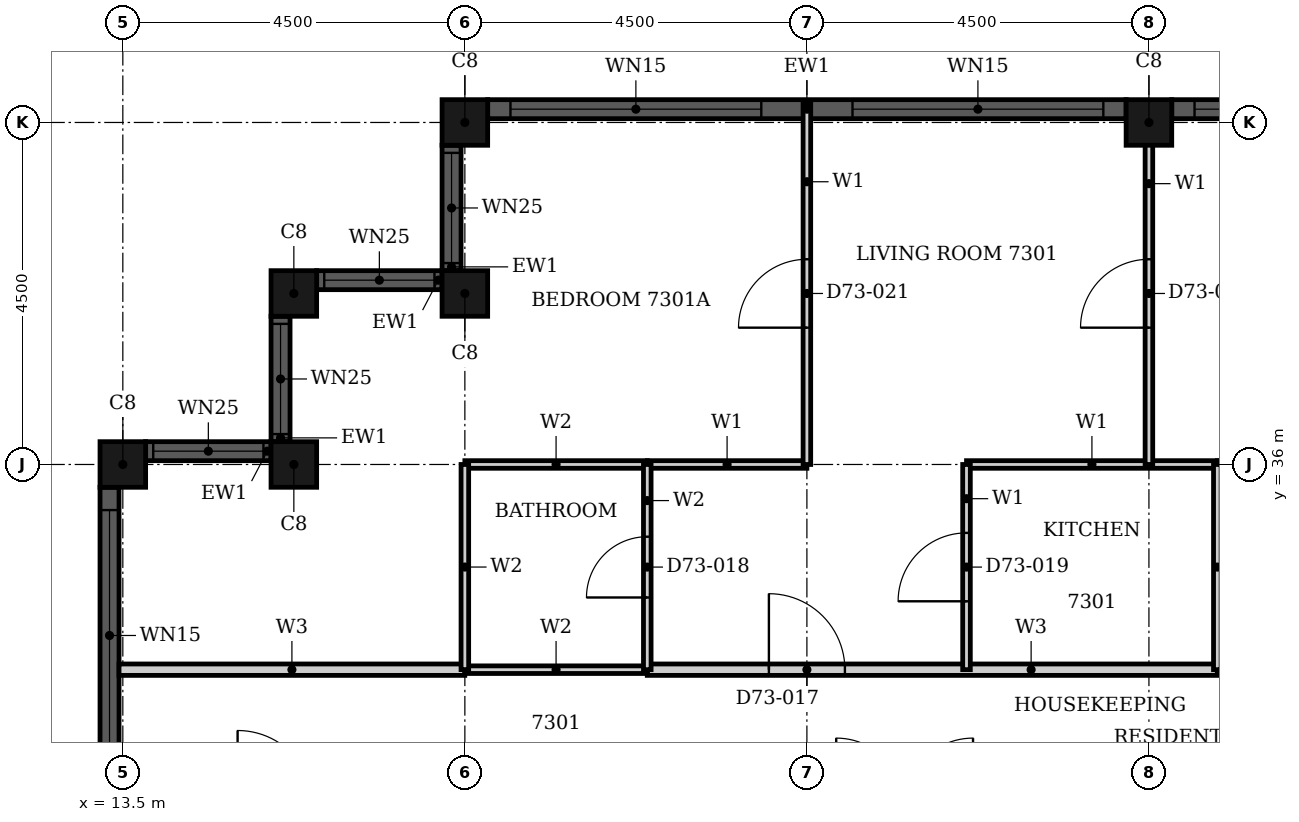
"""IFC4 building model, lengths in metres.
Left out: names, types, materials, properties, quantities, classifications, styles, units other than length and angle.
Written with IfcOpenShell. Run it as: python <this file> out.ifc"""

import sys

from ifc_helpers import new_model, si_unit, direction, frame, frame_2d, origin, origin_2d, place, context, subcontext, project, spatial, rectangle, hollow_rectangle, extrude, element, fill, save


model = new_model("IFC4")
c1 = context("Model", 3, precision=1e-05, world=origin(), true_north=direction((0.0, 1.0)))
c2 = subcontext(c1, "Body", "Model", "MODEL_VIEW")
j1 = project(units=[si_unit("LENGTHUNIT", "METRE"), si_unit("PLANEANGLEUNIT", "RADIAN")], contexts=[c1])
p1 = place(None, origin())
s1 = spatial("IfcSite", under=j1, at=p1, CompositionType="ELEMENT")
p2 = place(p1, origin())
s2 = spatial("IfcBuilding", under=s1, at=p2, CompositionType="ELEMENT")
p3 = place(p2, frame((0.0, 0.0, 287.1)))
s3 = spatial("IfcBuildingStorey", under=s2, at=p3, CompositionType="ELEMENT", Elevation=287.1)
for number, where, z_axis, x_axis in (
    (1, (27.0, 40.5, 0.0), (0.0, 0.0, 1.0), (1.0, 0.0, 0.0)),
    (2, (18.0, 40.5, 0.0), (0.0, 0.0, 1.0), (1.0, 0.0, 0.0)),
    (3, (18.0, 38.25, 0.0), (0.0, 0.0, 1.0), (1.0, 0.0, 0.0)),
    (4, (15.75, 38.25, 0.0), (0.0, 0.0, 1.0), (1.0, 0.0, 0.0)),
    (5, (15.75, 36.0, 0.0), (0.0, 0.0, 1.0), (1.0, 0.0, 0.0)),
    (6, (13.5, 36.0, 0.0), (0.0, 0.0, 1.0), (1.0, 0.0, 0.0)),
):
    element("IfcColumn", number, at=place(p3, frame(where, z_axis=z_axis, x_axis=x_axis)), inside=s3, PredefinedType="COLUMN", context=c2, shape_type="SweptSolid", body=[
        extrude(hollow_rectangle(XDim=0.6, YDim=0.6, WallThickness=0.02, at=origin_2d()), origin(), (0.0, 0.0, 1.0), 3.7),
    ])
p4 = place(p3, frame((35.7, 40.675, 0.0), z_axis=(0.0, 0.0, 1.0), x_axis=(-1.0, 0.0, 0.0)))
e7 = element("IfcWall", 7, at=p4, inside=s3, PredefinedType="SOLIDWALL", context=c2, shape_type="SweptSolid", body=[
    extrude(rectangle(XDim=8.4, YDim=0.25, at=frame_2d((4.2, 0.0))), origin(), (0.0, 0.0, 1.0), 3.7),
])
p5 = place(p4, frame((0.3, 0.0, 0.45)))
e8 = element("IfcOpeningElement", 8, at=p5, cuts=e7, PredefinedType="OPENING", context=c2, shape_type="SweptSolid", body=[
    extrude(rectangle(XDim=3.3, YDim=2.3, at=frame_2d((1.65, 1.15))), frame((0.0, 0.135, 0.0), z_axis=(0.0, -1.0, 0.0), x_axis=(1.0, 0.0, 0.0)), (0.0, 0.0, 1.0), 0.27),
])
p6 = place(p4, frame((4.8, 0.0, 0.45)))
e9 = element("IfcOpeningElement", 9, at=p6, cuts=e7, PredefinedType="OPENING", context=c2, shape_type="SweptSolid", body=[
    extrude(rectangle(XDim=3.3, YDim=2.3, at=frame_2d((1.65, 1.15))), frame((0.0, 0.135, 0.0), z_axis=(0.0, -1.0, 0.0), x_axis=(1.0, 0.0, 0.0)), (0.0, 0.0, 1.0), 0.27),
])
p7 = place(p3, frame((26.7, 40.675, 0.0), z_axis=(0.0, 0.0, 1.0), x_axis=(-1.0, 0.0, 0.0)))
e10 = element("IfcWall", 10, at=p7, inside=s3, PredefinedType="SOLIDWALL", context=c2, shape_type="SweptSolid", body=[
    extrude(rectangle(XDim=8.4, YDim=0.25, at=frame_2d((4.2, 0.0))), origin(), (0.0, 0.0, 1.0), 3.7),
])
p8 = place(p7, frame((0.3, 0.0, 0.45)))
e11 = element("IfcOpeningElement", 11, at=p8, cuts=e10, PredefinedType="OPENING", context=c2, shape_type="SweptSolid", body=[
    extrude(rectangle(XDim=3.3, YDim=2.3, at=frame_2d((1.65, 1.15))), frame((0.0, 0.135, 0.0), z_axis=(0.0, -1.0, 0.0), x_axis=(1.0, 0.0, 0.0)), (0.0, 0.0, 1.0), 0.27),
])
p9 = place(p7, frame((4.8, 0.0, 0.45)))
e12 = element("IfcOpeningElement", 12, at=p9, cuts=e10, PredefinedType="OPENING", context=c2, shape_type="SweptSolid", body=[
    extrude(rectangle(XDim=3.3, YDim=2.3, at=frame_2d((1.65, 1.15))), frame((0.0, 0.135, 0.0), z_axis=(0.0, -1.0, 0.0), x_axis=(1.0, 0.0, 0.0)), (0.0, 0.0, 1.0), 0.27),
])
p10 = place(p3, frame((17.825, 40.2, 0.0), z_axis=(0.0, 0.0, 1.0), x_axis=(0.0, -1.0, 0.0)))
e13 = element("IfcWall", 13, at=p10, inside=s3, PredefinedType="SOLIDWALL", context=c2, shape_type="SweptSolid", body=[
    extrude(rectangle(XDim=1.65, YDim=0.25, at=frame_2d((0.825, 0.0))), origin(), (0.0, 0.0, 1.0), 3.7),
])
p11 = place(p10, frame((0.1, 0.0, 0.9)))
e14 = element("IfcOpeningElement", 14, at=p11, cuts=e13, PredefinedType="OPENING", context=c2, shape_type="SweptSolid", body=[
    extrude(rectangle(XDim=1.45, YDim=1.85, at=frame_2d((0.725, 0.925))), frame((0.0, 0.135, 0.0), z_axis=(0.0, -1.0, 0.0), x_axis=(1.0, 0.0, 0.0)), (0.0, 0.0, 1.0), 0.27),
])
p12 = place(p3, frame((17.7, 38.425, 0.0), z_axis=(0.0, 0.0, 1.0), x_axis=(-1.0, 0.0, 0.0)))
e15 = element("IfcWall", 15, at=p12, inside=s3, PredefinedType="SOLIDWALL", context=c2, shape_type="SweptSolid", body=[
    extrude(rectangle(XDim=1.65, YDim=0.25, at=frame_2d((0.825, 0.0))), origin(), (0.0, 0.0, 1.0), 3.7),
])
p13 = place(p12, frame((0.1, 0.0, 0.9)))
e16 = element("IfcOpeningElement", 16, at=p13, cuts=e15, PredefinedType="OPENING", context=c2, shape_type="SweptSolid", body=[
    extrude(rectangle(XDim=1.45, YDim=1.85, at=frame_2d((0.725, 0.925))), frame((0.0, 0.135, 0.0), z_axis=(0.0, -1.0, 0.0), x_axis=(1.0, 0.0, 0.0)), (0.0, 0.0, 1.0), 0.27),
])
p14 = place(p3, frame((15.575, 37.95, 0.0), z_axis=(0.0, 0.0, 1.0), x_axis=(0.0, -1.0, 0.0)))
e17 = element("IfcWall", 17, at=p14, inside=s3, PredefinedType="SOLIDWALL", context=c2, shape_type="SweptSolid", body=[
    extrude(rectangle(XDim=1.65, YDim=0.25, at=frame_2d((0.825, 0.0))), origin(), (0.0, 0.0, 1.0), 3.7),
])
p15 = place(p14, frame((0.1, 0.0, 0.9)))
e18 = element("IfcOpeningElement", 18, at=p15, cuts=e17, PredefinedType="OPENING", context=c2, shape_type="SweptSolid", body=[
    extrude(rectangle(XDim=1.45, YDim=1.85, at=frame_2d((0.725, 0.925))), frame((0.0, 0.135, 0.0), z_axis=(0.0, -1.0, 0.0), x_axis=(1.0, 0.0, 0.0)), (0.0, 0.0, 1.0), 0.27),
])
p16 = place(p3, frame((15.45, 36.175, 0.0), z_axis=(0.0, 0.0, 1.0), x_axis=(-1.0, 0.0, 0.0)))
e19 = element("IfcWall", 19, at=p16, inside=s3, PredefinedType="SOLIDWALL", context=c2, shape_type="SweptSolid", body=[
    extrude(rectangle(XDim=1.65, YDim=0.25, at=frame_2d((0.825, 0.0))), origin(), (0.0, 0.0, 1.0), 3.7),
])
p17 = place(p16, frame((0.1, 0.0, 0.9)))
e20 = element("IfcOpeningElement", 20, at=p17, cuts=e19, PredefinedType="OPENING", context=c2, shape_type="SweptSolid", body=[
    extrude(rectangle(XDim=1.45, YDim=1.85, at=frame_2d((0.725, 0.925))), frame((0.0, 0.135, 0.0), z_axis=(0.0, -1.0, 0.0), x_axis=(1.0, 0.0, 0.0)), (0.0, 0.0, 1.0), 0.27),
])
p18 = place(p3, frame((13.325, 35.7, 0.0), z_axis=(0.0, 0.0, 1.0), x_axis=(0.0, -1.0, 0.0)))
e21 = element("IfcWall", 21, at=p18, inside=s3, PredefinedType="SOLIDWALL", context=c2, shape_type="SweptSolid", body=[
    extrude(rectangle(XDim=8.4, YDim=0.25, at=frame_2d((4.2, 0.0))), origin(), (0.0, 0.0, 1.0), 3.7),
])
p19 = place(p18, frame((0.3, 0.0, 0.45)))
e22 = element("IfcOpeningElement", 22, at=p19, cuts=e21, PredefinedType="OPENING", context=c2, shape_type="SweptSolid", body=[
    extrude(rectangle(XDim=3.3, YDim=2.3, at=frame_2d((1.65, 1.15))), frame((0.0, 0.135, 0.0), z_axis=(0.0, -1.0, 0.0), x_axis=(1.0, 0.0, 0.0)), (0.0, 0.0, 1.0), 0.27),
])
p20 = place(p18, frame((4.8, 0.0, 0.45)))
e23 = element("IfcOpeningElement", 23, at=p20, cuts=e21, PredefinedType="OPENING", context=c2, shape_type="SweptSolid", body=[
    extrude(rectangle(XDim=3.3, YDim=2.3, at=frame_2d((1.65, 1.15))), frame((0.0, 0.135, 0.0), z_axis=(0.0, -1.0, 0.0), x_axis=(1.0, 0.0, 0.0)), (0.0, 0.0, 1.0), 0.27),
])
p21 = place(p3, frame((13.45, 33.3, 0.0), z_axis=(0.0, 0.0, 1.0), x_axis=(1.0, 0.0, 0.0)))
e24 = element("IfcWall", 24, at=p21, inside=s3, PredefinedType="PARTITIONING", context=c2, shape_type="SweptSolid", body=[
    extrude(rectangle(XDim=4.549, YDim=0.15, at=frame_2d((2.274, 0.0))), origin(), (0.0, 0.0, 1.0), 3.4),
])
p22 = place(p3, frame((20.4, 33.3, 0.0), z_axis=(0.0, 0.0, 1.0), x_axis=(1.0, 0.0, 0.0)))
e25 = element("IfcWall", 25, at=p22, inside=s3, PredefinedType="PARTITIONING", context=c2, shape_type="SweptSolid", body=[
    extrude(rectangle(XDim=7.5, YDim=0.15, at=frame_2d((3.75, 0.0))), origin(), (0.0, 0.0, 1.0), 3.4),
])
p23 = place(p22, frame((1.6, 0.0, 0.0)))
e26 = element("IfcOpeningElement", 26, at=p23, cuts=e25, PredefinedType="OPENING", context=c2, shape_type="SweptSolid", body=[
    extrude(rectangle(XDim=1.0, YDim=2.2, at=frame_2d((0.5, 1.1))), frame((0.0, 0.085, 0.0), z_axis=(0.0, -1.0, 0.0), x_axis=(1.0, 0.0, 0.0)), (0.0, 0.0, 1.0), 0.17),
])
p24 = place(p3, frame((20.4, 36.0, 0.0), z_axis=(0.0, 0.0, 1.0), x_axis=(1.0, 0.0, 0.0)))
e27 = element("IfcWall", 27, at=p24, inside=s3, PredefinedType="PARTITIONING", context=c2, shape_type="SweptSolid", body=[
    extrude(rectangle(XDim=2.1, YDim=0.1, at=frame_2d((1.05, 0.0))), origin(), (0.0, 0.0, 1.0), 3.4),
])
p25 = place(p3, frame((24.6, 36.0, 0.0), z_axis=(0.0, 0.0, 1.0), x_axis=(1.0, 0.0, 0.0)))
e28 = element("IfcWall", 28, at=p25, inside=s3, PredefinedType="PARTITIONING", context=c2, shape_type="SweptSolid", body=[
    extrude(rectangle(XDim=3.3, YDim=0.1, at=frame_2d((1.65, 0.0))), origin(), (0.0, 0.0, 1.0), 3.4),
])
p26 = place(p3, frame((22.5, 36.0, 0.0), z_axis=(0.0, 0.0, 1.0), x_axis=(0.0, 1.0, 0.0)))
e29 = element("IfcWall", 29, at=p26, inside=s3, PredefinedType="PARTITIONING", context=c2, shape_type="SweptSolid", body=[
    extrude(rectangle(XDim=4.74, YDim=0.1, at=frame_2d((2.37, 0.0))), origin(), (0.0, 0.0, 1.0), 3.4),
])
p27 = place(p26, frame((1.8, 0.0, 0.0)))
e30 = element("IfcOpeningElement", 30, at=p27, cuts=e29, PredefinedType="OPENING", context=c2, shape_type="SweptSolid", body=[
    extrude(rectangle(XDim=0.9, YDim=2.1, at=frame_2d((0.45, 1.05))), frame((0.0, 0.06, 0.0), z_axis=(0.0, -1.0, 0.0), x_axis=(1.0, 0.0, 0.0)), (0.0, 0.0, 1.0), 0.12),
])
p28 = place(p3, frame((24.6, 33.3, 0.0), z_axis=(0.0, 0.0, 1.0), x_axis=(0.0, 1.0, 0.0)))
e31 = element("IfcWall", 31, at=p28, inside=s3, PredefinedType="PARTITIONING", context=c2, shape_type="SweptSolid", body=[
    extrude(rectangle(XDim=2.7, YDim=0.1, at=frame_2d((1.35, 0.0))), origin(), (0.0, 0.0, 1.0), 3.4),
])
p29 = place(p28, frame((0.9, 0.0, 0.0)))
e32 = element("IfcOpeningElement", 32, at=p29, cuts=e31, PredefinedType="OPENING", context=c2, shape_type="SweptSolid", body=[
    extrude(rectangle(XDim=0.9, YDim=2.1, at=frame_2d((0.45, 1.05))), frame((0.0, 0.06, 0.0), z_axis=(0.0, -1.0, 0.0), x_axis=(1.0, 0.0, 0.0)), (0.0, 0.0, 1.0), 0.12),
])
p30 = place(p3, frame((27.0, 36.0, 0.0), z_axis=(0.0, 0.0, 1.0), x_axis=(0.0, 1.0, 0.0)))
e33 = element("IfcWall", 33, at=p30, inside=s3, PredefinedType="PARTITIONING", context=c2, shape_type="SweptSolid", body=[
    extrude(rectangle(XDim=4.69, YDim=0.1, at=frame_2d((2.345, 0.0))), origin(), (0.0, 0.0, 1.0), 3.4),
])
p31 = place(p30, frame((1.8, 0.0, 0.0)))
e34 = element("IfcOpeningElement", 34, at=p31, cuts=e33, PredefinedType="OPENING", context=c2, shape_type="SweptSolid", body=[
    extrude(rectangle(XDim=0.9, YDim=2.1, at=frame_2d((0.45, 1.05))), frame((0.0, 0.06, 0.0), z_axis=(0.0, -1.0, 0.0), x_axis=(1.0, 0.0, 0.0)), (0.0, 0.0, 1.0), 0.12),
])
p32 = place(p3, frame((18.0, 33.3, 0.0), z_axis=(0.0, 0.0, 1.0), x_axis=(1.0, 0.0, 0.0)))
e35 = element("IfcWall", 35, at=p32, inside=s3, PredefinedType="PARTITIONING", context=c2, shape_type="SweptSolid", body=[
    extrude(rectangle(XDim=2.4, YDim=0.1, at=frame_2d((1.2, 0.0))), origin(), (0.0, 0.0, 1.0), 3.4),
])
p33 = place(p3, frame((27.9, 33.3, 0.0), z_axis=(0.0, 0.0, 1.0), x_axis=(1.0, 0.0, 0.0)))
e36 = element("IfcWall", 36, at=p33, inside=s3, PredefinedType="PARTITIONING", context=c2, shape_type="SweptSolid", body=[
    extrude(rectangle(XDim=7.2, YDim=0.1, at=frame_2d((3.6, 0.0))), origin(), (0.0, 0.0, 1.0), 3.4),
])
p34 = place(p3, frame((18.0, 36.0, 0.0), z_axis=(0.0, 0.0, 1.0), x_axis=(1.0, 0.0, 0.0)))
e37 = element("IfcWall", 37, at=p34, inside=s3, PredefinedType="PARTITIONING", context=c2, shape_type="SweptSolid", body=[
    extrude(rectangle(XDim=2.4, YDim=0.1, at=frame_2d((1.2, 0.0))), origin(), (0.0, 0.0, 1.0), 3.4),
])
p35 = place(p3, frame((27.9, 36.0, 0.0), z_axis=(0.0, 0.0, 1.0), x_axis=(1.0, 0.0, 0.0)))
e38 = element("IfcWall", 38, at=p35, inside=s3, PredefinedType="PARTITIONING", context=c2, shape_type="SweptSolid", body=[
    extrude(rectangle(XDim=7.2, YDim=0.1, at=frame_2d((3.6, 0.0))), origin(), (0.0, 0.0, 1.0), 3.4),
])
p36 = place(p35, frame((1.4, 0.0, 0.0)))
e39 = element("IfcOpeningElement", 39, at=p36, cuts=e38, PredefinedType="OPENING", context=c2, shape_type="SweptSolid", body=[
    extrude(rectangle(XDim=0.8, YDim=2.1, at=frame_2d((0.4, 1.05))), frame((0.0, 0.06, 0.0), z_axis=(0.0, -1.0, 0.0), x_axis=(1.0, 0.0, 0.0)), (0.0, 0.0, 1.0), 0.12),
])
p37 = place(p35, frame((5.0, 0.0, 0.0)))
e40 = element("IfcOpeningElement", 40, at=p37, cuts=e38, PredefinedType="OPENING", context=c2, shape_type="SweptSolid", body=[
    extrude(rectangle(XDim=0.8, YDim=2.1, at=frame_2d((0.4, 1.05))), frame((0.0, 0.06, 0.0), z_axis=(0.0, -1.0, 0.0), x_axis=(1.0, 0.0, 0.0)), (0.0, 0.0, 1.0), 0.12),
])
p38 = place(p3, frame((18.0, 33.301, 0.0), z_axis=(0.0, 0.0, 1.0), x_axis=(0.0, 1.0, 0.0)))
e41 = element("IfcWall", 41, at=p38, inside=s3, PredefinedType="PARTITIONING", context=c2, shape_type="SweptSolid", body=[
    extrude(rectangle(XDim=2.699, YDim=0.1, at=frame_2d((1.35, 0.0))), origin(), (0.0, 0.0, 1.0), 3.4),
])
p39 = place(p3, frame((20.4, 33.3, 0.0), z_axis=(0.0, 0.0, 1.0), x_axis=(0.0, 1.0, 0.0)))
e42 = element("IfcWall", 42, at=p39, inside=s3, PredefinedType="PARTITIONING", context=c2, shape_type="SweptSolid", body=[
    extrude(rectangle(XDim=2.7, YDim=0.1, at=frame_2d((1.35, 0.0))), origin(), (0.0, 0.0, 1.0), 3.4),
])
p40 = place(p39, frame((0.95, 0.0, 0.0)))
e43 = element("IfcOpeningElement", 43, at=p40, cuts=e42, PredefinedType="OPENING", context=c2, shape_type="SweptSolid", body=[
    extrude(rectangle(XDim=0.8, YDim=2.1, at=frame_2d((0.4, 1.05))), frame((0.0, 0.06, 0.0), z_axis=(0.0, -1.0, 0.0), x_axis=(1.0, 0.0, 0.0)), (0.0, 0.0, 1.0), 0.12),
])
p41 = place(p3, frame((27.9, 33.3, 0.0), z_axis=(0.0, 0.0, 1.0), x_axis=(0.0, 1.0, 0.0)))
e44 = element("IfcWall", 44, at=p41, inside=s3, PredefinedType="PARTITIONING", context=c2, shape_type="SweptSolid", body=[
    extrude(rectangle(XDim=2.7, YDim=0.1, at=frame_2d((1.35, 0.0))), origin(), (0.0, 0.0, 1.0), 3.4),
])
p42 = place(p6, origin())
e45 = element("IfcWindow", 45, at=p42, inside=s3, PartitioningType="SINGLE_PANEL", PredefinedType="WINDOW", context=c2, shape_type="SweptSolid", body=[
    extrude(rectangle(XDim=3.3, YDim=2.3, at=frame_2d((1.65, 1.15))), frame((0.0, 0.03, 0.0), z_axis=(0.0, -1.0, 0.0), x_axis=(1.0, 0.0, 0.0)), (0.0, 0.0, 1.0), 0.06),
])
fill(e9, e45)
p43 = place(p8, origin())
e46 = element("IfcWindow", 46, at=p43, inside=s3, PartitioningType="SINGLE_PANEL", PredefinedType="WINDOW", context=c2, shape_type="SweptSolid", body=[
    extrude(rectangle(XDim=3.3, YDim=2.3, at=frame_2d((1.65, 1.15))), frame((0.0, 0.03, 0.0), z_axis=(0.0, -1.0, 0.0), x_axis=(1.0, 0.0, 0.0)), (0.0, 0.0, 1.0), 0.06),
])
fill(e11, e46)
p44 = place(p9, origin())
e47 = element("IfcWindow", 47, at=p44, inside=s3, PartitioningType="SINGLE_PANEL", PredefinedType="WINDOW", context=c2, shape_type="SweptSolid", body=[
    extrude(rectangle(XDim=3.3, YDim=2.3, at=frame_2d((1.65, 1.15))), frame((0.0, 0.03, 0.0), z_axis=(0.0, -1.0, 0.0), x_axis=(1.0, 0.0, 0.0)), (0.0, 0.0, 1.0), 0.06),
])
fill(e12, e47)
p45 = place(p11, origin())
e48 = element("IfcWindow", 48, at=p45, inside=s3, PartitioningType="SINGLE_PANEL", PredefinedType="WINDOW", context=c2, shape_type="SweptSolid", body=[
    extrude(rectangle(XDim=1.45, YDim=1.85, at=frame_2d((0.725, 0.925))), frame((0.0, 0.03, 0.0), z_axis=(0.0, -1.0, 0.0), x_axis=(1.0, 0.0, 0.0)), (0.0, 0.0, 1.0), 0.06),
])
fill(e14, e48)
p46 = place(p13, origin())
e49 = element("IfcWindow", 49, at=p46, inside=s3, PartitioningType="SINGLE_PANEL", PredefinedType="WINDOW", context=c2, shape_type="SweptSolid", body=[
    extrude(rectangle(XDim=1.45, YDim=1.85, at=frame_2d((0.725, 0.925))), frame((0.0, 0.03, 0.0), z_axis=(0.0, -1.0, 0.0), x_axis=(1.0, 0.0, 0.0)), (0.0, 0.0, 1.0), 0.06),
])
fill(e16, e49)
p47 = place(p15, origin())
e50 = element("IfcWindow", 50, at=p47, inside=s3, PartitioningType="SINGLE_PANEL", PredefinedType="WINDOW", context=c2, shape_type="SweptSolid", body=[
    extrude(rectangle(XDim=1.45, YDim=1.85, at=frame_2d((0.725, 0.925))), frame((0.0, 0.03, 0.0), z_axis=(0.0, -1.0, 0.0), x_axis=(1.0, 0.0, 0.0)), (0.0, 0.0, 1.0), 0.06),
])
fill(e18, e50)
p48 = place(p17, origin())
e51 = element("IfcWindow", 51, at=p48, inside=s3, PartitioningType="SINGLE_PANEL", PredefinedType="WINDOW", context=c2, shape_type="SweptSolid", body=[
    extrude(rectangle(XDim=1.45, YDim=1.85, at=frame_2d((0.725, 0.925))), frame((0.0, 0.03, 0.0), z_axis=(0.0, -1.0, 0.0), x_axis=(1.0, 0.0, 0.0)), (0.0, 0.0, 1.0), 0.06),
])
fill(e20, e51)
p49 = place(p19, origin())
e52 = element("IfcWindow", 52, at=p49, inside=s3, PartitioningType="SINGLE_PANEL", PredefinedType="WINDOW", context=c2, shape_type="SweptSolid", body=[
    extrude(rectangle(XDim=3.3, YDim=2.3, at=frame_2d((1.65, 1.15))), frame((0.0, 0.03, 0.0), z_axis=(0.0, -1.0, 0.0), x_axis=(1.0, 0.0, 0.0)), (0.0, 0.0, 1.0), 0.06),
])
fill(e22, e52)
p50 = place(p23, origin())
e53 = element("IfcDoor", 53, at=p50, inside=s3, OperationType="SINGLE_SWING_RIGHT", PredefinedType="DOOR", context=c2, shape_type="SweptSolid", body=[
    extrude(rectangle(XDim=1.0, YDim=2.2, at=frame_2d((0.5, 1.1))), frame((0.0, 0.025, 0.0), z_axis=(0.0, -1.0, 0.0), x_axis=(1.0, 0.0, 0.0)), (0.0, 0.0, 1.0), 0.05),
])
fill(e26, e53)
p51 = place(p40, origin())
e54 = element("IfcDoor", 54, at=p51, inside=s3, OperationType="SINGLE_SWING_LEFT", PredefinedType="DOOR", context=c2, shape_type="SweptSolid", body=[
    extrude(rectangle(XDim=0.8, YDim=2.1, at=frame_2d((0.4, 1.05))), frame((0.0, 0.025, 0.0), z_axis=(0.0, -1.0, 0.0), x_axis=(1.0, 0.0, 0.0)), (0.0, 0.0, 1.0), 0.05),
])
fill(e43, e54)
p52 = place(p29, origin())
e55 = element("IfcDoor", 55, at=p52, inside=s3, OperationType="SINGLE_SWING_LEFT", PredefinedType="DOOR", context=c2, shape_type="SweptSolid", body=[
    extrude(rectangle(XDim=0.9, YDim=2.1, at=frame_2d((0.45, 1.05))), frame((0.0, 0.025, 0.0), z_axis=(0.0, -1.0, 0.0), x_axis=(1.0, 0.0, 0.0)), (0.0, 0.0, 1.0), 0.05),
])
fill(e32, e55)
p53 = place(p27, origin())
e56 = element("IfcDoor", 56, at=p53, inside=s3, OperationType="SINGLE_SWING_RIGHT", PredefinedType="DOOR", context=c2, shape_type="SweptSolid", body=[
    extrude(rectangle(XDim=0.9, YDim=2.1, at=frame_2d((0.45, 1.05))), frame((0.0, 0.025, 0.0), z_axis=(0.0, -1.0, 0.0), x_axis=(1.0, 0.0, 0.0)), (0.0, 0.0, 1.0), 0.05),
])
fill(e30, e56)
p54 = place(p31, origin())
e57 = element("IfcDoor", 57, at=p54, inside=s3, OperationType="SINGLE_SWING_RIGHT", PredefinedType="DOOR", context=c2, shape_type="SweptSolid", body=[
    extrude(rectangle(XDim=0.9, YDim=2.1, at=frame_2d((0.45, 1.05))), frame((0.0, 0.025, 0.0), z_axis=(0.0, -1.0, 0.0), x_axis=(1.0, 0.0, 0.0)), (0.0, 0.0, 1.0), 0.05),
])
fill(e34, e57)
save(model, sys.argv[1])
